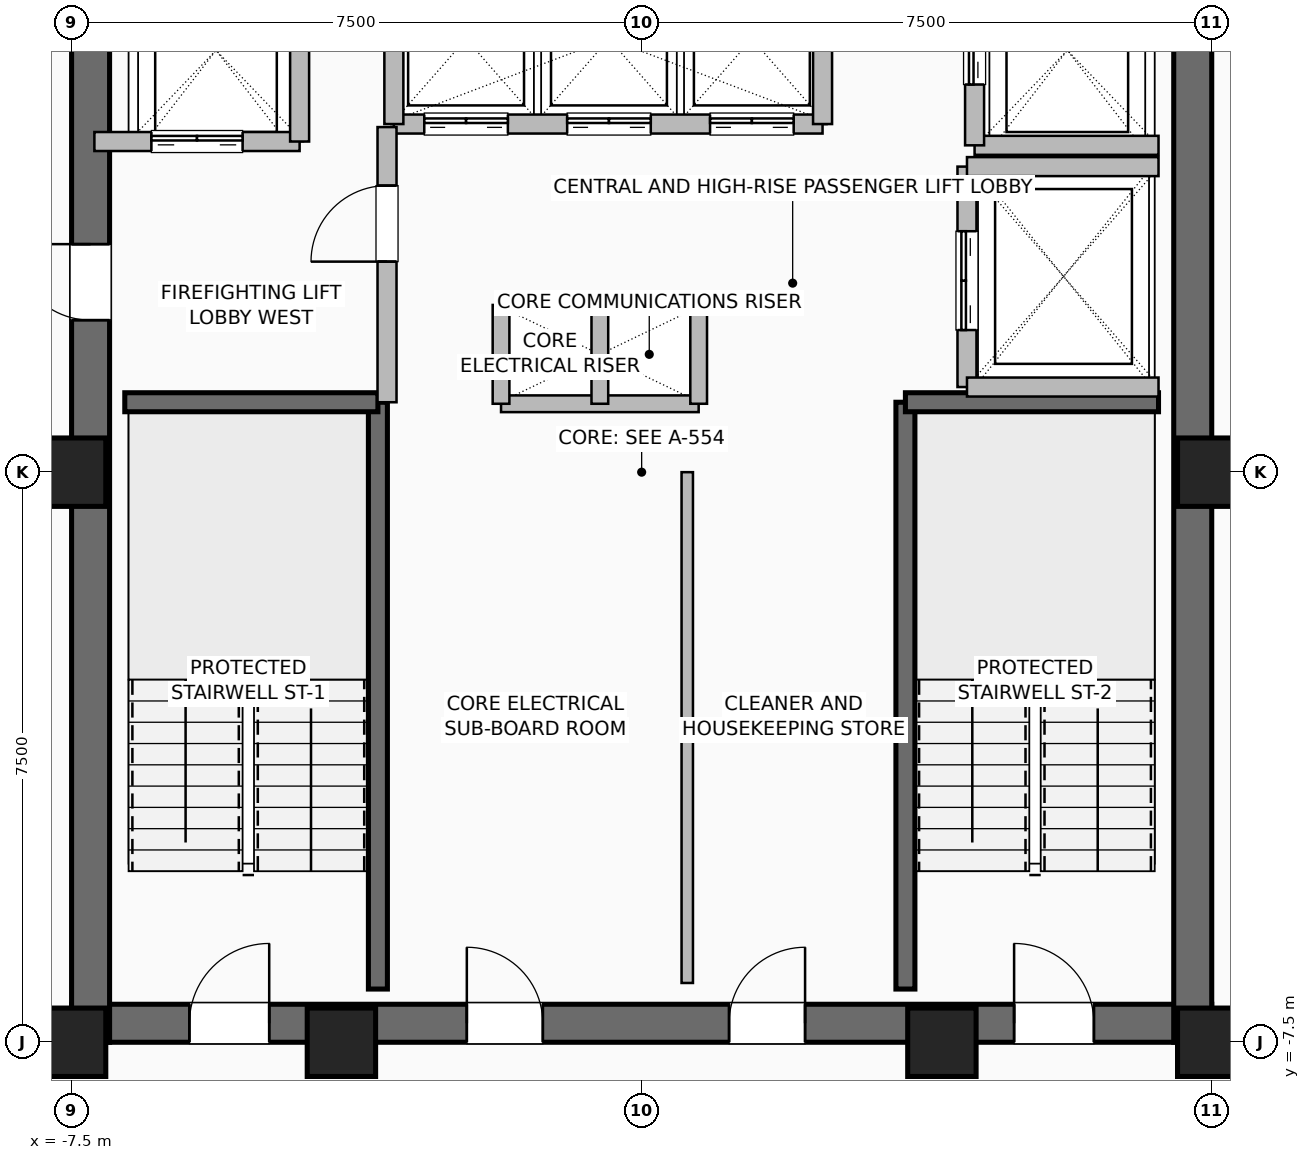
"""IFC4 building model, lengths in metres.
Left out: names, types, materials, properties, quantities, classifications, styles, units other than length and angle.
Written with IfcOpenShell. Run it as: python <this file> out.ifc"""

import sys

from ifc_helpers import new_model, si_unit, direction, frame, frame_2d, origin, origin_2d, place, context, subcontext, project, spatial, rectangle, hollow_rectangle, extrude, element, fill, save


model = new_model("IFC4")
c1 = context("Model", 3, precision=1e-05, world=origin(), true_north=direction((0.0, 1.0)))
c2 = subcontext(c1, "Body", "Model", "MODEL_VIEW")
j1 = project(units=[si_unit("LENGTHUNIT", "METRE"), si_unit("PLANEANGLEUNIT", "RADIAN")], contexts=[c1])
p1 = place(None, origin())
s1 = spatial("IfcSite", under=j1, at=p1, CompositionType="ELEMENT")
p2 = place(p1, origin())
s2 = spatial("IfcBuilding", under=s1, at=p2, CompositionType="ELEMENT")
p3 = place(p2, frame((0.0, 0.0, 216.6)))
s3 = spatial("IfcBuildingStorey", under=s2, at=p3, CompositionType="ELEMENT", Elevation=216.6)
for number, where, z_axis, x_axis in (
    (1, (-7.5, -7.5, 0.0), (0.0, 0.0, 1.0), (1.0, 0.0, 0.0)),
    (2, (-3.95, -7.5, 0.0), (0.0, 0.0, 1.0), (1.0, 0.0, 0.0)),
    (3, (3.95, -7.5, 0.0), (0.0, 0.0, 1.0), (1.0, 0.0, 0.0)),
    (4, (7.5, -7.5, 0.0), (0.0, 0.0, 1.0), (1.0, 0.0, 0.0)),
    (5, (7.5, 0.0, 0.0), (0.0, 0.0, 1.0), (1.0, 0.0, 0.0)),
    (6, (-7.5, 0.0, 0.0), (0.0, 0.0, 1.0), (1.0, 0.0, 0.0)),
):
    element("IfcColumn", number, at=place(p3, frame(where, z_axis=z_axis, x_axis=x_axis)), inside=s3, PredefinedType="COLUMN", context=c2, shape_type="SweptSolid", body=[
        extrude(hollow_rectangle(XDim=0.9, YDim=0.9, WallThickness=0.045, at=origin_2d()), origin(), (0.0, 0.0, 1.0), 3.6),
    ])
p4 = place(p3, frame((-7.5, -7.25, 0.0), z_axis=(0.0, 0.0, 1.0), x_axis=(1.0, 0.0, 0.0)))
e7 = element("IfcWall", 7, at=p4, inside=s3, PredefinedType="SHEAR", context=c2, shape_type="SweptSolid", body=[
    extrude(rectangle(XDim=15.0, YDim=0.5, at=frame_2d((7.5, 0.0))), origin(), (0.0, 0.0, 1.0), 3.36),
])
p5 = place(p4, frame((1.55, 0.0, 0.0)))
e8 = element("IfcOpeningElement", 8, at=p5, cuts=e7, PredefinedType="OPENING", context=c2, shape_type="SweptSolid", body=[
    extrude(rectangle(XDim=1.05, YDim=2.08, at=frame_2d((0.525, 1.04))), frame((0.0, 0.26, 0.0), z_axis=(0.0, -1.0, 0.0), x_axis=(1.0, 0.0, 0.0)), (0.0, 0.0, 1.0), 0.52),
])
p6 = place(p4, frame((12.4, 0.0, 0.0)))
e9 = element("IfcOpeningElement", 9, at=p6, cuts=e7, PredefinedType="OPENING", context=c2, shape_type="SweptSolid", body=[
    extrude(rectangle(XDim=1.05, YDim=2.08, at=frame_2d((0.525, 1.04))), frame((0.0, 0.26, 0.0), z_axis=(0.0, -1.0, 0.0), x_axis=(1.0, 0.0, 0.0)), (0.0, 0.0, 1.0), 0.52),
])
p7 = place(p4, frame((5.2, 0.0, 0.0)))
e10 = element("IfcOpeningElement", 10, at=p7, cuts=e7, PredefinedType="OPENING", context=c2, shape_type="SweptSolid", body=[
    extrude(rectangle(XDim=1.0, YDim=2.08, at=frame_2d((0.5, 1.04))), frame((0.0, 0.26, 0.0), z_axis=(0.0, -1.0, 0.0), x_axis=(1.0, 0.0, 0.0)), (0.0, 0.0, 1.0), 0.52),
])
p8 = place(p4, frame((8.65, 0.0, 0.0)))
e11 = element("IfcOpeningElement", 11, at=p8, cuts=e7, PredefinedType="OPENING", context=c2, shape_type="SweptSolid", body=[
    extrude(rectangle(XDim=1.0, YDim=2.08, at=frame_2d((0.5, 1.04))), frame((0.0, 0.26, 0.0), z_axis=(0.0, -1.0, 0.0), x_axis=(1.0, 0.0, 0.0)), (0.0, 0.0, 1.0), 0.52),
])
p9 = place(p3, frame((-7.25, -7.5, 0.0), z_axis=(0.0, 0.0, 1.0), x_axis=(0.0, 1.0, 0.0)))
e12 = element("IfcWall", 12, at=p9, inside=s3, PredefinedType="SHEAR", context=c2, shape_type="SweptSolid", body=[
    extrude(rectangle(XDim=15.0, YDim=0.5, at=frame_2d((7.5, 0.0))), origin(), (0.0, 0.0, 1.0), 3.36),
])
p10 = place(p9, frame((9.5, 0.0, 0.0)))
e13 = element("IfcOpeningElement", 13, at=p10, cuts=e12, PredefinedType="OPENING", context=c2, shape_type="SweptSolid", body=[
    extrude(rectangle(XDim=1.0, YDim=2.08, at=frame_2d((0.5, 1.04))), frame((0.0, 0.26, 0.0), z_axis=(0.0, -1.0, 0.0), x_axis=(1.0, 0.0, 0.0)), (0.0, 0.0, 1.0), 0.52),
])
p11 = place(p3, frame((7.25, -7.5, 0.0), z_axis=(0.0, 0.0, 1.0), x_axis=(0.0, 1.0, 0.0)))
e14 = element("IfcWall", 14, at=p11, inside=s3, PredefinedType="SHEAR", context=c2, shape_type="SweptSolid", body=[
    extrude(rectangle(XDim=15.0, YDim=0.5, at=frame_2d((7.5, 0.0))), origin(), (0.0, 0.0, 1.0), 3.36),
])
p12 = place(p3, frame((-3.47, -6.8, 0.0), z_axis=(0.0, 0.0, 1.0), x_axis=(0.0, 1.0, 0.0)))
e15 = element("IfcWall", 15, at=p12, inside=s3, PredefinedType="SHEAR", context=c2, shape_type="SweptSolid", body=[
    extrude(rectangle(XDim=7.72, YDim=0.25, at=frame_2d((3.86, 0.0))), origin(), (0.0, 0.0, 1.0), 3.36),
])
p13 = place(p3, frame((-6.8, 0.92, 0.0), z_axis=(0.0, 0.0, 1.0), x_axis=(1.0, 0.0, 0.0)))
e16 = element("IfcWall", 16, at=p13, inside=s3, PredefinedType="SHEAR", context=c2, shape_type="SweptSolid", body=[
    extrude(rectangle(XDim=3.33, YDim=0.25, at=frame_2d((1.665, 0.0))), origin(), (0.0, 0.0, 1.0), 3.36),
])
p14 = place(p3, frame((3.47, -6.8, 0.0), z_axis=(0.0, 0.0, 1.0), x_axis=(0.0, 1.0, 0.0)))
e17 = element("IfcWall", 17, at=p14, inside=s3, PredefinedType="SHEAR", context=c2, shape_type="SweptSolid", body=[
    extrude(rectangle(XDim=7.72, YDim=0.25, at=frame_2d((3.86, 0.0))), origin(), (0.0, 0.0, 1.0), 3.36),
])
p15 = place(p3, frame((3.47, 0.92, 0.0), z_axis=(0.0, 0.0, 1.0), x_axis=(1.0, 0.0, 0.0)))
e18 = element("IfcWall", 18, at=p15, inside=s3, PredefinedType="SHEAR", context=c2, shape_type="SweptSolid", body=[
    extrude(rectangle(XDim=3.33, YDim=0.25, at=frame_2d((1.665, 0.0))), origin(), (0.0, 0.0, 1.0), 3.36),
])
for number, where, z_axis, x_axis in (
    (19, (-1.85, 2.2, 0.0), (0.0, 0.0, 1.0), (1.0, 0.0, 0.0)),
    (20, (-1.85, 0.9, 0.0), (0.0, 0.0, 1.0), (1.0, 0.0, 0.0)),
):
    element("IfcWall", number, at=place(p3, frame(where, z_axis=z_axis, x_axis=x_axis)), inside=s3, PredefinedType="PARTITIONING", context=c2, shape_type="SweptSolid", body=[
        extrude(rectangle(XDim=2.6, YDim=0.22, at=frame_2d((1.3, 0.0))), origin(), (0.0, 0.0, 1.0), 3.36),
    ])
for number, where, z_axis, x_axis in (
    (21, (-0.55, 0.9, 0.0), (0.0, 0.0, 1.0), (0.0, 1.0, 0.0)),
    (22, (0.75, 0.9, 0.0), (0.0, 0.0, 1.0), (0.0, 1.0, 0.0)),
    (23, (-1.85, 0.9, 0.0), (0.0, 0.0, 1.0), (0.0, 1.0, 0.0)),
):
    element("IfcWall", number, at=place(p3, frame(where, z_axis=z_axis, x_axis=x_axis)), inside=s3, PredefinedType="PARTITIONING", context=c2, shape_type="SweptSolid", body=[
        extrude(rectangle(XDim=1.3, YDim=0.22, at=frame_2d((0.65, 0.0))), origin(), (0.0, 0.0, 1.0), 3.36),
    ])
p16 = place(p3, frame((-3.26, 4.58, 0.0), z_axis=(0.0, 0.0, 1.0), x_axis=(1.0, 0.0, 0.0)))
e24 = element("IfcWall", 24, at=p16, inside=s3, PredefinedType="SHEAR", context=c2, shape_type="SweptSolid", body=[
    extrude(rectangle(XDim=5.64, YDim=0.25, at=frame_2d((2.82, 0.0))), origin(), (0.0, 0.0, 1.0), 3.36),
])
p17 = place(p16, frame((0.4, 0.0, 0.0)))
e25 = element("IfcOpeningElement", 25, at=p17, cuts=e24, PredefinedType="OPENING", context=c2, shape_type="SweptSolid", body=[
    extrude(rectangle(XDim=1.1, YDim=2.2, at=frame_2d((0.55, 1.1))), frame((0.0, 0.135, 0.0), z_axis=(0.0, -1.0, 0.0), x_axis=(1.0, 0.0, 0.0)), (0.0, 0.0, 1.0), 0.27),
])
p18 = place(p16, frame((2.28, 0.0, 0.0)))
e26 = element("IfcOpeningElement", 26, at=p18, cuts=e24, PredefinedType="OPENING", context=c2, shape_type="SweptSolid", body=[
    extrude(rectangle(XDim=1.1, YDim=2.2, at=frame_2d((0.55, 1.1))), frame((0.0, 0.135, 0.0), z_axis=(0.0, -1.0, 0.0), x_axis=(1.0, 0.0, 0.0)), (0.0, 0.0, 1.0), 0.27),
])
p19 = place(p16, frame((4.16, 0.0, 0.0)))
e27 = element("IfcOpeningElement", 27, at=p19, cuts=e24, PredefinedType="OPENING", context=c2, shape_type="SweptSolid", body=[
    extrude(rectangle(XDim=1.1, YDim=2.2, at=frame_2d((0.55, 1.1))), frame((0.0, 0.135, 0.0), z_axis=(0.0, -1.0, 0.0), x_axis=(1.0, 0.0, 0.0)), (0.0, 0.0, 1.0), 0.27),
])
for number, where, z_axis, x_axis in (
    (28, (-3.26, 4.58, 0.0), (0.0, 0.0, 1.0), (0.0, 1.0, 0.0)),
    (29, (2.38, 4.58, 0.0), (0.0, 0.0, 1.0), (0.0, 1.0, 0.0)),
):
    element("IfcWall", number, at=place(p3, frame(where, z_axis=z_axis, x_axis=x_axis)), inside=s3, PredefinedType="SHEAR", context=c2, shape_type="SweptSolid", body=[
        extrude(rectangle(XDim=2.22, YDim=0.25, at=frame_2d((1.11, 0.0))), origin(), (0.0, 0.0, 1.0), 3.36),
    ])
p20 = place(p3, frame((-7.2, 4.35, 0.0), z_axis=(0.0, 0.0, 1.0), x_axis=(1.0, 0.0, 0.0)))
e30 = element("IfcWall", 30, at=p20, inside=s3, PredefinedType="SHEAR", context=c2, shape_type="SweptSolid", body=[
    extrude(rectangle(XDim=2.7, YDim=0.25, at=frame_2d((1.35, 0.0))), origin(), (0.0, 0.0, 1.0), 3.36),
])
p21 = place(p20, frame((0.75, 0.0, 0.0)))
e31 = element("IfcOpeningElement", 31, at=p21, cuts=e30, PredefinedType="OPENING", context=c2, shape_type="SweptSolid", body=[
    extrude(rectangle(XDim=1.2, YDim=2.2, at=frame_2d((0.6, 1.1))), frame((0.0, 0.135, 0.0), z_axis=(0.0, -1.0, 0.0), x_axis=(1.0, 0.0, 0.0)), (0.0, 0.0, 1.0), 0.27),
])
p22 = place(p3, frame((-4.5, 4.35, 0.0), z_axis=(0.0, 0.0, 1.0), x_axis=(0.0, 1.0, 0.0)))
e32 = element("IfcWall", 32, at=p22, inside=s3, PredefinedType="SHEAR", context=c2, shape_type="SweptSolid", body=[
    extrude(rectangle(XDim=2.85, YDim=0.25, at=frame_2d((1.425, 0.0))), origin(), (0.0, 0.0, 1.0), 3.36),
])
p23 = place(p3, frame((4.38, 4.3, 0.0), z_axis=(0.0, 0.0, 1.0), x_axis=(1.0, 0.0, 0.0)))
e33 = element("IfcWall", 33, at=p23, inside=s3, PredefinedType="SHEAR", context=c2, shape_type="SweptSolid", body=[
    extrude(rectangle(XDim=2.42, YDim=0.25, at=frame_2d((1.21, 0.0))), origin(), (0.0, 0.0, 1.0), 3.36),
])
p24 = place(p3, frame((4.38, 4.3, 0.0), z_axis=(0.0, 0.0, 1.0), x_axis=(0.0, 1.0, 0.0)))
e34 = element("IfcWall", 34, at=p24, inside=s3, PredefinedType="SHEAR", context=c2, shape_type="SweptSolid", body=[
    extrude(rectangle(XDim=2.5, YDim=0.25, at=frame_2d((1.25, 0.0))), origin(), (0.0, 0.0, 1.0), 3.36),
])
p25 = place(p24, frame((0.8, 0.0, 0.0)))
e35 = element("IfcOpeningElement", 35, at=p25, cuts=e34, PredefinedType="OPENING", context=c2, shape_type="SweptSolid", body=[
    extrude(rectangle(XDim=1.2, YDim=2.2, at=frame_2d((0.6, 1.1))), frame((0.0, 0.135, 0.0), z_axis=(0.0, -1.0, 0.0), x_axis=(1.0, 0.0, 0.0)), (0.0, 0.0, 1.0), 0.27),
])
p26 = place(p3, frame((4.28, 1.12, 0.0), z_axis=(0.0, 0.0, 1.0), x_axis=(0.0, 1.0, 0.0)))
e36 = element("IfcWall", 36, at=p26, inside=s3, PredefinedType="SHEAR", context=c2, shape_type="SweptSolid", body=[
    extrude(rectangle(XDim=2.9, YDim=0.25, at=frame_2d((1.45, 0.0))), origin(), (0.0, 0.0, 1.0), 3.36),
])
p27 = place(p26, frame((0.75, 0.0, 0.0)))
e37 = element("IfcOpeningElement", 37, at=p27, cuts=e36, PredefinedType="OPENING", context=c2, shape_type="SweptSolid", body=[
    extrude(rectangle(XDim=1.3, YDim=2.3, at=frame_2d((0.65, 1.15))), frame((0.0, 0.135, 0.0), z_axis=(0.0, -1.0, 0.0), x_axis=(1.0, 0.0, 0.0)), (0.0, 0.0, 1.0), 0.27),
])
for number, where, z_axis, x_axis in (
    (38, (4.28, 1.12, 0.0), (0.0, 0.0, 1.0), (1.0, 0.0, 0.0)),
    (39, (4.28, 4.02, 0.0), (0.0, 0.0, 1.0), (1.0, 0.0, 0.0)),
):
    element("IfcWall", number, at=place(p3, frame(where, z_axis=z_axis, x_axis=x_axis)), inside=s3, PredefinedType="SHEAR", context=c2, shape_type="SweptSolid", body=[
        extrude(rectangle(XDim=2.52, YDim=0.25, at=frame_2d((1.26, 0.0))), origin(), (0.0, 0.0, 1.0), 3.36),
    ])
p28 = place(p3, frame((-3.35, 0.92, 0.0), z_axis=(0.0, 0.0, 1.0), x_axis=(0.0, 1.0, 0.0)))
e40 = element("IfcWall", 40, at=p28, inside=s3, PredefinedType="SHEAR", context=c2, shape_type="SweptSolid", body=[
    extrude(rectangle(XDim=3.62, YDim=0.25, at=frame_2d((1.81, 0.0))), origin(), (0.0, 0.0, 1.0), 3.36),
])
p29 = place(p28, frame((1.85, 0.0, 0.0)))
e41 = element("IfcOpeningElement", 41, at=p29, cuts=e40, PredefinedType="OPENING", context=c2, shape_type="SweptSolid", body=[
    extrude(rectangle(XDim=1.0, YDim=2.08, at=frame_2d((0.5, 1.04))), frame((0.0, 0.135, 0.0), z_axis=(0.0, -1.0, 0.0), x_axis=(1.0, 0.0, 0.0)), (0.0, 0.0, 1.0), 0.27),
])
p30 = place(p3, frame((0.6, -6.72, 0.0), z_axis=(0.0, 0.0, 1.0), x_axis=(0.0, 1.0, 0.0)))
e42 = element("IfcWall", 42, at=p30, inside=s3, PredefinedType="PARTITIONING", context=c2, shape_type="SweptSolid", body=[
    extrude(rectangle(XDim=6.72, YDim=0.15, at=frame_2d((3.36, 0.0))), origin(), (0.0, 0.0, 1.0), 3.36),
])
p31 = place(p3, frame((7.45, -7.48, 0.0), z_axis=(0.0, 0.0, 1.0), x_axis=(1.0, 0.0, 0.0)))
e43 = element("IfcWall", 43, at=p31, inside=s3, PredefinedType="PARTITIONING", context=c2, shape_type="SweptSolid", body=[
    extrude(rectangle(XDim=0.95, YDim=0.15, at=frame_2d((0.475, 0.0))), origin(), (0.0, 0.0, 1.0), 3.36),
])
p32 = place(p5, origin())
e44 = element("IfcDoor", 44, at=p32, inside=s3, OperationType="SINGLE_SWING_RIGHT", PredefinedType="DOOR", context=c2, shape_type="SweptSolid", body=[
    extrude(rectangle(XDim=1.05, YDim=2.08, at=frame_2d((0.525, 1.04))), frame((0.0, 0.025, 0.0), z_axis=(0.0, -1.0, 0.0), x_axis=(1.0, 0.0, 0.0)), (0.0, 0.0, 1.0), 0.05),
])
fill(e8, e44)
p33 = place(p6, origin())
e45 = element("IfcDoor", 45, at=p33, inside=s3, OperationType="SINGLE_SWING_LEFT", PredefinedType="DOOR", context=c2, shape_type="SweptSolid", body=[
    extrude(rectangle(XDim=1.05, YDim=2.08, at=frame_2d((0.525, 1.04))), frame((0.0, 0.025, 0.0), z_axis=(0.0, -1.0, 0.0), x_axis=(1.0, 0.0, 0.0)), (0.0, 0.0, 1.0), 0.05),
])
fill(e9, e45)
p34 = place(p10, origin())
e46 = element("IfcDoor", 46, at=p34, inside=s3, OperationType="SINGLE_SWING_RIGHT", PredefinedType="DOOR", context=c2, shape_type="SweptSolid", body=[
    extrude(rectangle(XDim=1.0, YDim=2.08, at=frame_2d((0.5, 1.04))), frame((0.0, 0.025, 0.0), z_axis=(0.0, -1.0, 0.0), x_axis=(1.0, 0.0, 0.0)), (0.0, 0.0, 1.0), 0.05),
])
fill(e13, e46)
p35 = place(p7, origin())
e47 = element("IfcDoor", 47, at=p35, inside=s3, OperationType="SINGLE_SWING_LEFT", PredefinedType="DOOR", context=c2, shape_type="SweptSolid", body=[
    extrude(rectangle(XDim=1.0, YDim=2.08, at=frame_2d((0.5, 1.04))), frame((0.0, 0.025, 0.0), z_axis=(0.0, -1.0, 0.0), x_axis=(1.0, 0.0, 0.0)), (0.0, 0.0, 1.0), 0.05),
])
fill(e10, e47)
p36 = place(p8, origin())
e48 = element("IfcDoor", 48, at=p36, inside=s3, OperationType="SINGLE_SWING_RIGHT", PredefinedType="DOOR", context=c2, shape_type="SweptSolid", body=[
    extrude(rectangle(XDim=1.0, YDim=2.08, at=frame_2d((0.5, 1.04))), frame((0.0, 0.025, 0.0), z_axis=(0.0, -1.0, 0.0), x_axis=(1.0, 0.0, 0.0)), (0.0, 0.0, 1.0), 0.05),
])
fill(e11, e48)
p37 = place(p17, origin())
e49 = element("IfcDoor", 49, at=p37, inside=s3, OperationType="DOUBLE_DOOR_SLIDING", PredefinedType="DOOR", context=c2, shape_type="SweptSolid", body=[
    extrude(rectangle(XDim=1.1, YDim=2.2, at=frame_2d((0.55, 1.1))), frame((0.0, 0.025, 0.0), z_axis=(0.0, -1.0, 0.0), x_axis=(1.0, 0.0, 0.0)), (0.0, 0.0, 1.0), 0.05),
])
fill(e25, e49)
p38 = place(p18, origin())
e50 = element("IfcDoor", 50, at=p38, inside=s3, OperationType="DOUBLE_DOOR_SLIDING", PredefinedType="DOOR", context=c2, shape_type="SweptSolid", body=[
    extrude(rectangle(XDim=1.1, YDim=2.2, at=frame_2d((0.55, 1.1))), frame((0.0, 0.025, 0.0), z_axis=(0.0, -1.0, 0.0), x_axis=(1.0, 0.0, 0.0)), (0.0, 0.0, 1.0), 0.05),
])
fill(e26, e50)
p39 = place(p19, origin())
e51 = element("IfcDoor", 51, at=p39, inside=s3, OperationType="DOUBLE_DOOR_SLIDING", PredefinedType="DOOR", context=c2, shape_type="SweptSolid", body=[
    extrude(rectangle(XDim=1.1, YDim=2.2, at=frame_2d((0.55, 1.1))), frame((0.0, 0.025, 0.0), z_axis=(0.0, -1.0, 0.0), x_axis=(1.0, 0.0, 0.0)), (0.0, 0.0, 1.0), 0.05),
])
fill(e27, e51)
p40 = place(p21, origin())
e52 = element("IfcDoor", 52, at=p40, inside=s3, OperationType="DOUBLE_DOOR_SLIDING", PredefinedType="DOOR", context=c2, shape_type="SweptSolid", body=[
    extrude(rectangle(XDim=1.2, YDim=2.2, at=frame_2d((0.6, 1.1))), frame((0.0, 0.025, 0.0), z_axis=(0.0, -1.0, 0.0), x_axis=(1.0, 0.0, 0.0)), (0.0, 0.0, 1.0), 0.05),
])
fill(e31, e52)
p41 = place(p25, origin())
e53 = element("IfcDoor", 53, at=p41, inside=s3, OperationType="DOUBLE_DOOR_SLIDING", PredefinedType="DOOR", context=c2, shape_type="SweptSolid", body=[
    extrude(rectangle(XDim=1.2, YDim=2.2, at=frame_2d((0.6, 1.1))), frame((0.0, 0.025, 0.0), z_axis=(0.0, -1.0, 0.0), x_axis=(1.0, 0.0, 0.0)), (0.0, 0.0, 1.0), 0.05),
])
fill(e35, e53)
p42 = place(p27, origin())
e54 = element("IfcDoor", 54, at=p42, inside=s3, OperationType="DOUBLE_DOOR_SLIDING", PredefinedType="DOOR", context=c2, shape_type="SweptSolid", body=[
    extrude(rectangle(XDim=1.3, YDim=2.3, at=frame_2d((0.65, 1.15))), frame((0.0, 0.025, 0.0), z_axis=(0.0, -1.0, 0.0), x_axis=(1.0, 0.0, 0.0)), (0.0, 0.0, 1.0), 0.05),
])
fill(e37, e54)
p43 = place(p29, origin())
e55 = element("IfcDoor", 55, at=p43, inside=s3, OperationType="SINGLE_SWING_LEFT", PredefinedType="DOOR", context=c2, shape_type="SweptSolid", body=[
    extrude(rectangle(XDim=1.0, YDim=2.08, at=frame_2d((0.5, 1.04))), frame((0.0, 0.025, 0.0), z_axis=(0.0, -1.0, 0.0), x_axis=(1.0, 0.0, 0.0)), (0.0, 0.0, 1.0), 0.05),
])
fill(e41, e55)
save(model, sys.argv[1])
